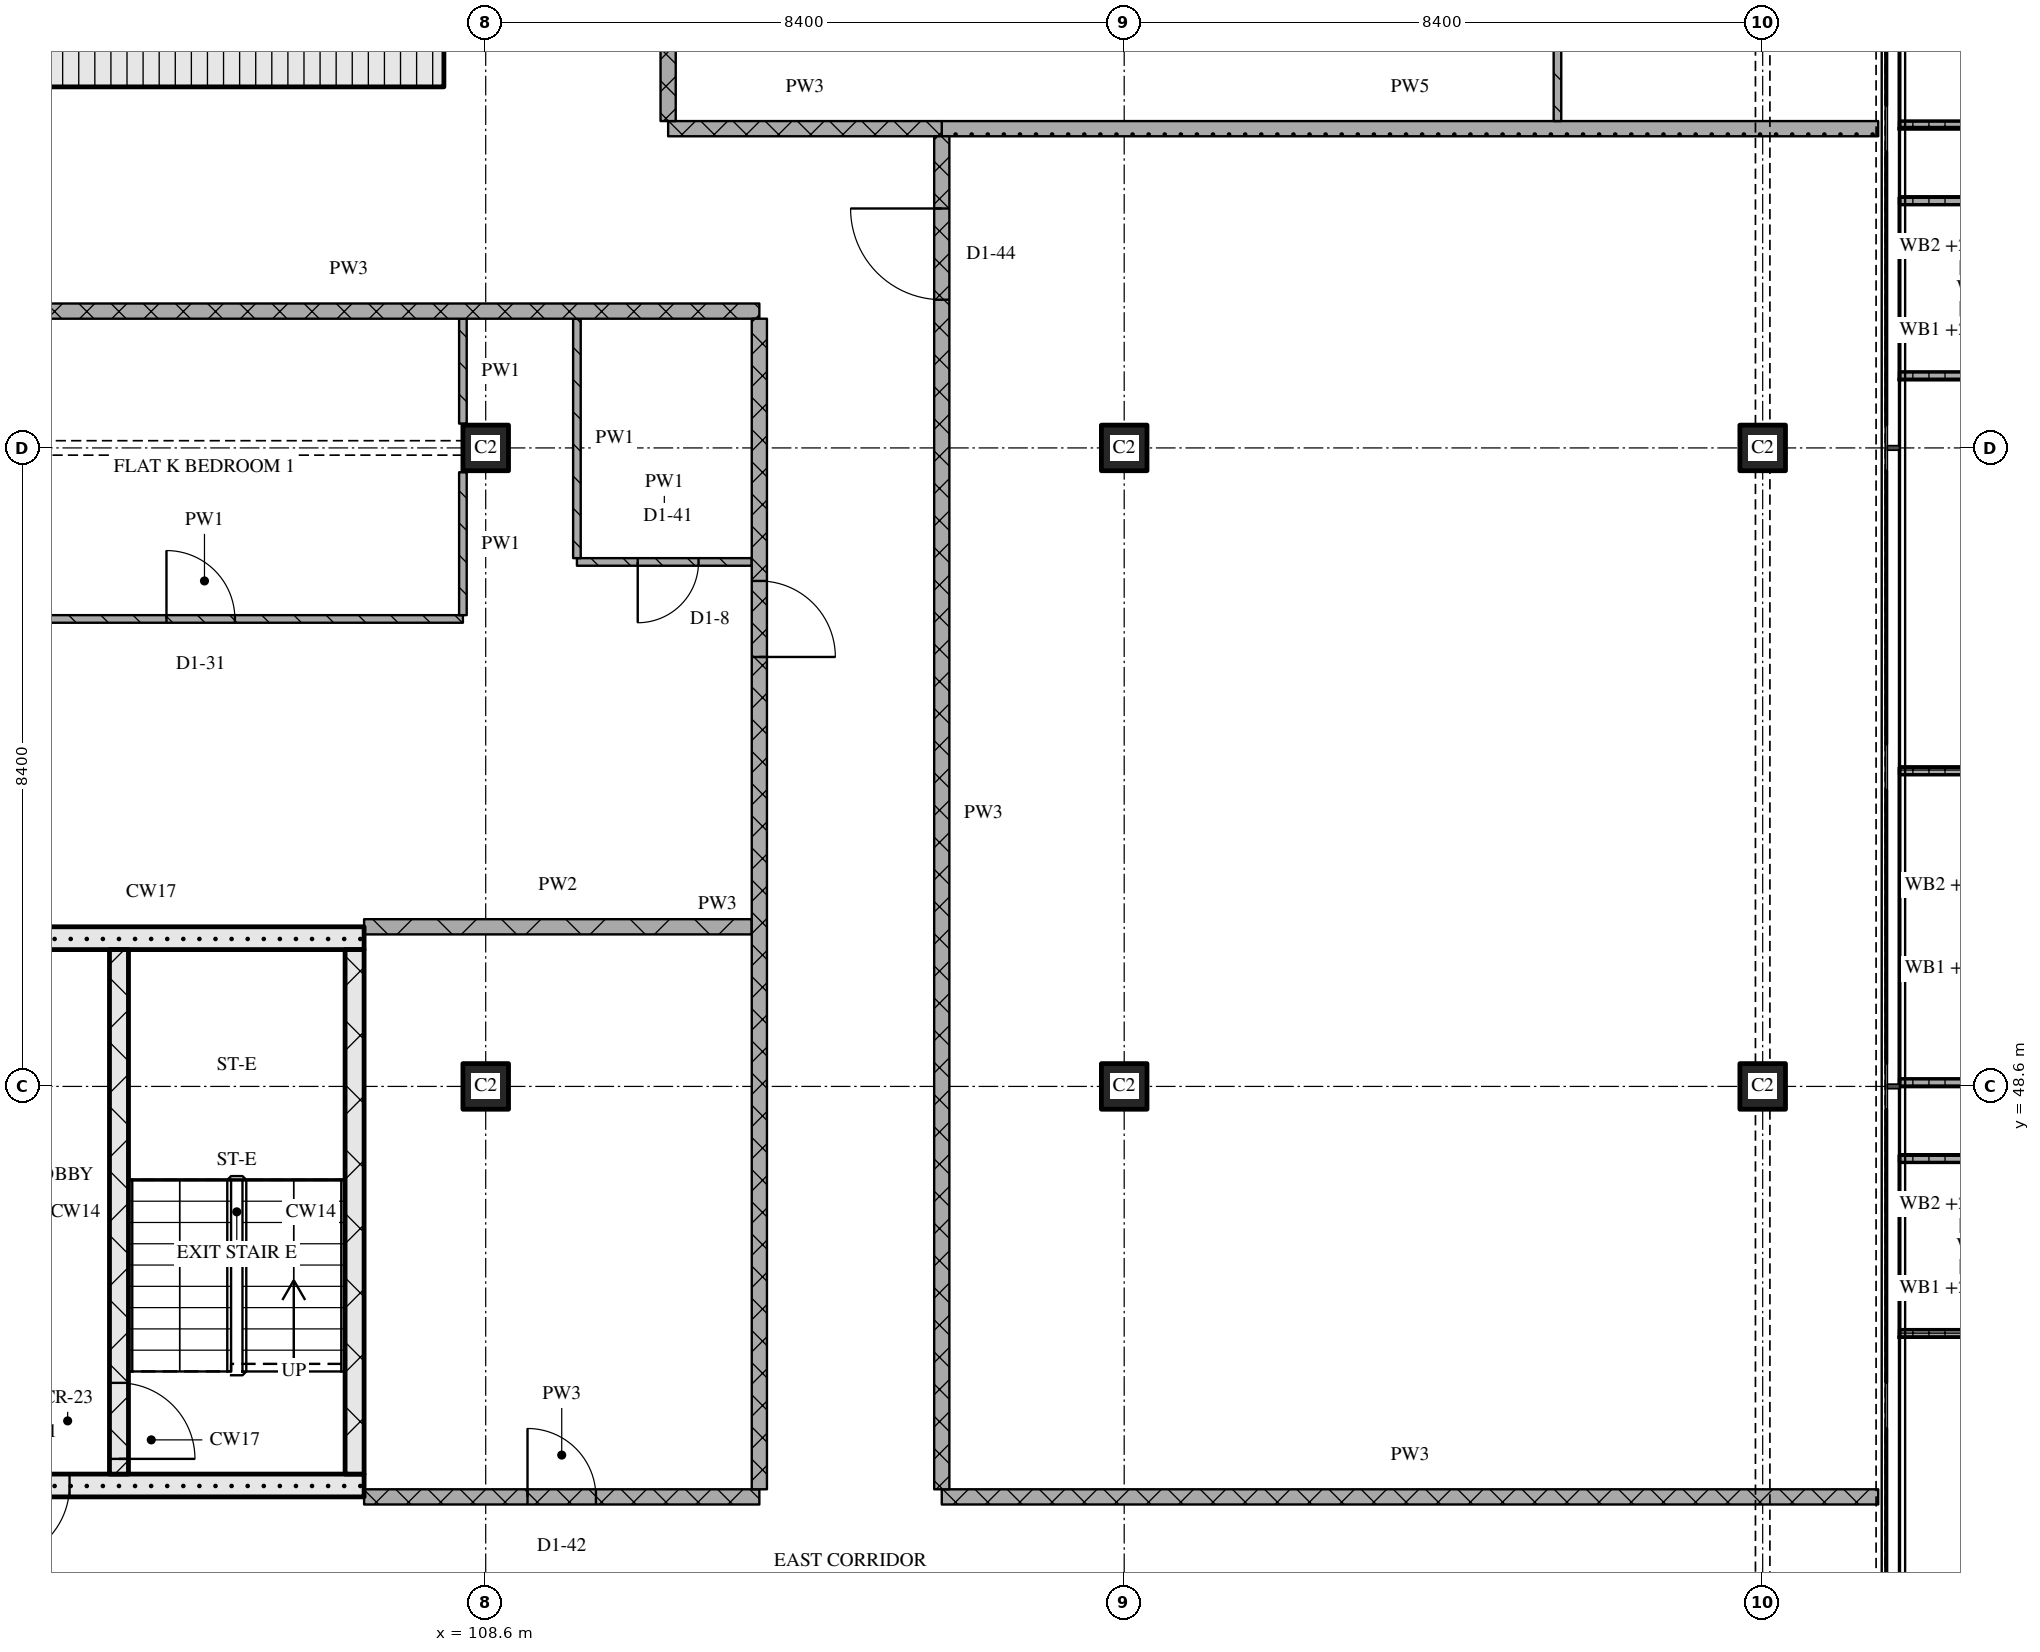
"""IFC4 building model, lengths in metres.
Left out: names, types, materials, properties, quantities, classifications, styles, units other than length and angle.
Written with IfcOpenShell. Run it as: python <this file> out.ifc"""

import sys

from ifc_helpers import new_model, si_unit, direction, frame, frame_2d, origin, origin_2d, place, context, subcontext, project, spatial, polyline, rectangle, outline, extrude, element, fill, save


model = new_model("IFC4")
c1 = context("Model", 3, precision=1e-05, world=origin(), true_north=direction((0.0, 1.0)))
c2 = subcontext(c1, "Body", "Model", "MODEL_VIEW")
j1 = project(units=[si_unit("LENGTHUNIT", "METRE"), si_unit("PLANEANGLEUNIT", "RADIAN")], contexts=[c1])
p1 = place(None, origin())
s1 = spatial("IfcSite", under=j1, at=p1, CompositionType="ELEMENT")
p2 = place(p1, origin())
s2 = spatial("IfcBuilding", under=s1, at=p2, CompositionType="ELEMENT")
p3 = place(p2, frame((0.0, 0.0, 209.1)))
s3 = spatial("IfcBuildingStorey", under=s2, at=p3, CompositionType="ELEMENT", Elevation=209.1)
for number, where, z_axis, x_axis in (
    (1, (108.6, 48.6, 0.0), (0.0, 0.0, 1.0), (1.0, 0.0, 0.0)),
    (2, (108.6, 57.0, 0.0), (0.0, 0.0, 1.0), (1.0, 0.0, 0.0)),
    (3, (117.0, 48.6, 0.0), (0.0, 0.0, 1.0), (1.0, 0.0, 0.0)),
    (4, (117.0, 57.0, 0.0), (0.0, 0.0, 1.0), (1.0, 0.0, 0.0)),
    (5, (125.4, 48.6, 0.0), (0.0, 0.0, 1.0), (1.0, 0.0, 0.0)),
    (6, (125.4, 57.0, 0.0), (0.0, 0.0, 1.0), (1.0, 0.0, 0.0)),
):
    element("IfcColumn", number, at=place(p3, frame(where, z_axis=z_axis, x_axis=x_axis)), inside=s3, PredefinedType="COLUMN", context=c2, shape_type="SweptSolid", body=[
        extrude(rectangle(XDim=0.6, YDim=0.6, at=origin_2d()), origin(), (0.0, 0.0, 1.0), 3.6),
    ])
p4 = place(p3, origin())
e7 = element("IfcWall", 7, at=p4, inside=s3, PredefinedType="SOLIDWALL", context=c2, shape_type="SweptSolid", body=[
    extrude(outline(polyline([(127.2, 45.3), (127.2, 45.4), (128.7, 45.4), (128.7, 47.6), (127.2, 47.6), (127.2, 47.7), (128.8, 47.7), (128.8, 45.3), (127.2, 45.3)])), origin(), (0.0, 0.0, 1.0), 1.0),
])
p5 = place(p3, origin())
e8 = element("IfcWall", 8, at=p5, inside=s3, PredefinedType="SOLIDWALL", context=c2, shape_type="SweptSolid", body=[
    extrude(outline(polyline([(127.2, 48.6), (127.2, 48.7), (128.833, 48.7), (128.833, 52.7), (127.2, 52.7), (127.2, 52.8), (128.933, 52.8), (128.933, 48.6), (127.2, 48.6)])), origin(), (0.0, 0.0, 1.0), 1.0),
])
p6 = place(p3, origin())
e9 = element("IfcWall", 9, at=p6, inside=s3, PredefinedType="SOLIDWALL", context=c2, shape_type="SweptSolid", body=[
    extrude(outline(polyline([(127.2, 57.9), (127.2, 58.0), (128.7, 58.0), (128.7, 60.2), (127.2, 60.2), (127.2, 60.3), (128.8, 60.3), (128.8, 57.9), (127.2, 57.9)])), origin(), (0.0, 0.0, 1.0), 1.0),
])
p7 = place(p3, origin())
e10 = element("IfcWall", 10, at=p7, inside=s3, PredefinedType="SOLIDWALL", context=c2, shape_type="SweptSolid", body=[
    extrude(outline(polyline([(127.2, 61.2), (127.2, 61.3), (128.833, 61.3), (128.833, 65.3), (127.2, 65.3), (127.2, 65.4), (128.933, 65.4), (128.933, 61.2), (127.2, 61.2)])), origin(), (0.0, 0.0, 1.0), 1.0),
])
p8 = place(p3, frame((67.15, 62.075, 0.0), z_axis=(0.0, 0.0, 1.0), x_axis=(1.0, 0.0, 0.0)))
e11 = element("IfcWall", 11, at=p8, inside=s3, PredefinedType="SOLIDWALL", context=c2, shape_type="SweptSolid", body=[
    extrude(rectangle(XDim=40.9, YDim=0.65, at=frame_2d((20.45, 0.0))), origin(), (0.0, 0.0, 1.0), 3.32),
])
p9 = place(p8, frame((20.8, 0.0, 0.0)))
e12 = element("IfcOpeningElement", 12, at=p9, cuts=e11, PredefinedType="OPENING", context=c2, shape_type="SweptSolid", body=[
    extrude(rectangle(XDim=1.8, YDim=2.1, at=frame_2d((0.9, 1.05))), frame((0.0, 0.335, 0.0), z_axis=(0.0, -1.0, 0.0), x_axis=(1.0, 0.0, 0.0)), (0.0, 0.0, 1.0), 0.67),
])
p10 = place(p3, frame((101.4, 43.35, 0.0), z_axis=(0.0, 0.0, 1.0), x_axis=(1.0, 0.0, 0.0)))
e13 = element("IfcWall", 13, at=p10, inside=s3, PredefinedType="SOLIDWALL", context=c2, shape_type="SweptSolid", body=[
    extrude(rectangle(XDim=5.6, YDim=0.3, at=frame_2d((2.8, 0.0))), origin(), (0.0, 0.0, 1.0), 3.32),
])
p11 = place(p10, frame((0.725, 0.0, 0.0)))
e14 = element("IfcOpeningElement", 14, at=p11, cuts=e13, PredefinedType="OPENING", context=c2, shape_type="SweptSolid", body=[
    extrude(rectangle(XDim=1.0, YDim=2.1, at=frame_2d((0.5, 1.05))), frame((0.0, 0.16, 0.0), z_axis=(0.0, -1.0, 0.0), x_axis=(1.0, 0.0, 0.0)), (0.0, 0.0, 1.0), 0.32),
])
p12 = place(p3, frame((103.775, 43.5, 0.0), z_axis=(0.0, 0.0, 1.0), x_axis=(0.0, 1.0, 0.0)))
e15 = element("IfcWall", 15, at=p12, inside=s3, PredefinedType="SOLIDWALL", context=c2, shape_type="SweptSolid", body=[
    extrude(rectangle(XDim=6.9, YDim=0.25, at=frame_2d((3.45, 0.0))), origin(), (0.0, 0.0, 1.0), 3.32),
])
p13 = place(p12, frame((0.2, 0.0, 0.0)))
e16 = element("IfcOpeningElement", 16, at=p13, cuts=e15, PredefinedType="OPENING", context=c2, shape_type="SweptSolid", body=[
    extrude(rectangle(XDim=1.0, YDim=2.1, at=frame_2d((0.5, 1.05))), frame((0.0, 0.135, 0.0), z_axis=(0.0, -1.0, 0.0), x_axis=(1.0, 0.0, 0.0)), (0.0, 0.0, 1.0), 0.27),
])
p14 = place(p3, frame((106.875, 43.5, 0.0), z_axis=(0.0, 0.0, 1.0), x_axis=(0.0, 1.0, 0.0)))
e17 = element("IfcWall", 17, at=p14, inside=s3, PredefinedType="SOLIDWALL", context=c2, shape_type="SweptSolid", body=[
    extrude(rectangle(XDim=6.9, YDim=0.25, at=frame_2d((3.45, 0.0))), origin(), (0.0, 0.0, 1.0), 3.32),
])
p15 = place(p3, frame((101.4, 50.55, 0.0), z_axis=(0.0, 0.0, 1.0), x_axis=(1.0, 0.0, 0.0)))
e18 = element("IfcWall", 18, at=p15, inside=s3, PredefinedType="SOLIDWALL", context=c2, shape_type="SweptSolid", body=[
    extrude(rectangle(XDim=5.6, YDim=0.3, at=frame_2d((2.8, 0.0))), origin(), (0.0, 0.0, 1.0), 3.32),
])
p16 = place(p3, frame((107.0, 43.2, 0.0), z_axis=(0.0, 0.0, 1.0), x_axis=(1.0, 0.0, 0.0)))
e19 = element("IfcWall", 19, at=p16, inside=s3, PredefinedType="PARTITIONING", context=c2, shape_type="SweptSolid", body=[
    extrude(rectangle(XDim=5.2, YDim=0.2, at=frame_2d((2.6, 0.0))), origin(), (0.0, 0.0, 1.0), 3.32),
])
p17 = place(p16, frame((2.15, 0.0, 0.0)))
e20 = element("IfcOpeningElement", 20, at=p17, cuts=e19, PredefinedType="OPENING", context=c2, shape_type="SweptSolid", body=[
    extrude(rectangle(XDim=0.9, YDim=2.1, at=frame_2d((0.45, 1.05))), frame((0.0, 0.11, 0.0), z_axis=(0.0, -1.0, 0.0), x_axis=(1.0, 0.0, 0.0)), (0.0, 0.0, 1.0), 0.22),
])
p18 = place(p3, frame((114.6, 43.2, 0.0), z_axis=(0.0, 0.0, 1.0), x_axis=(1.0, 0.0, 0.0)))
e21 = element("IfcWall", 21, at=p18, inside=s3, PredefinedType="PARTITIONING", context=c2, shape_type="SweptSolid", body=[
    extrude(rectangle(XDim=12.32, YDim=0.2, at=frame_2d((6.16, 0.0))), origin(), (0.0, 0.0, 1.0), 3.32),
])
p19 = place(p3, frame((107.0, 50.7, 0.0), z_axis=(0.0, 0.0, 1.0), x_axis=(1.0, 0.0, 0.0)))
e22 = element("IfcWall", 22, at=p19, inside=s3, PredefinedType="PARTITIONING", context=c2, shape_type="SweptSolid", body=[
    extrude(rectangle(XDim=5.1, YDim=0.2, at=frame_2d((2.55, 0.0))), origin(), (0.0, 0.0, 1.0), 3.32),
])
p20 = place(p3, frame((101.5, 54.75, 0.0), z_axis=(0.0, 0.0, 1.0), x_axis=(1.0, 0.0, 0.0)))
e23 = element("IfcWall", 23, at=p20, inside=s3, PredefinedType="PARTITIONING", context=c2, shape_type="SweptSolid", body=[
    extrude(rectangle(XDim=6.8, YDim=0.1, at=frame_2d((3.4, 0.0))), origin(), (0.0, 0.0, 1.0), 3.32),
])
p21 = place(p20, frame((2.9, 0.0, 0.0)))
e24 = element("IfcOpeningElement", 24, at=p21, cuts=e23, PredefinedType="OPENING", context=c2, shape_type="SweptSolid", body=[
    extrude(rectangle(XDim=0.9, YDim=2.1, at=frame_2d((0.45, 1.05))), frame((0.0, 0.06, 0.0), z_axis=(0.0, -1.0, 0.0), x_axis=(1.0, 0.0, 0.0)), (0.0, 0.0, 1.0), 0.12),
])
p22 = place(p3, frame((109.8, 55.5, 0.0), z_axis=(0.0, 0.0, 1.0), x_axis=(1.0, 0.0, 0.0)))
e25 = element("IfcWall", 25, at=p22, inside=s3, PredefinedType="PARTITIONING", context=c2, shape_type="SweptSolid", body=[
    extrude(rectangle(XDim=2.3, YDim=0.1, at=frame_2d((1.15, 0.0))), origin(), (0.0, 0.0, 1.0), 3.32),
])
p23 = place(p22, frame((0.8, 0.0, 0.0)))
e26 = element("IfcOpeningElement", 26, at=p23, cuts=e25, PredefinedType="OPENING", context=c2, shape_type="SweptSolid", body=[
    extrude(rectangle(XDim=0.8, YDim=2.1, at=frame_2d((0.4, 1.05))), frame((0.0, 0.06, 0.0), z_axis=(0.0, -1.0, 0.0), x_axis=(1.0, 0.0, 0.0)), (0.0, 0.0, 1.0), 0.12),
])
p24 = place(p3, frame((101.4, 58.8, 0.0), z_axis=(0.0, 0.0, 1.0), x_axis=(1.0, 0.0, 0.0)))
e27 = element("IfcWall", 27, at=p24, inside=s3, PredefinedType="PARTITIONING", context=c2, shape_type="SweptSolid", body=[
    extrude(rectangle(XDim=10.8, YDim=0.2, at=frame_2d((5.4, 0.0))), origin(), (0.0, 0.0, 1.0), 3.32),
])
p25 = place(p3, frame((111.0, 61.2, 0.0), z_axis=(0.0, 0.0, 1.0), x_axis=(1.0, 0.0, 0.0)))
e28 = element("IfcWall", 28, at=p25, inside=s3, PredefinedType="PARTITIONING", context=c2, shape_type="SweptSolid", body=[
    extrude(rectangle(XDim=3.6, YDim=0.2, at=frame_2d((1.8, 0.0))), origin(), (0.0, 0.0, 1.0), 3.32),
])
p26 = place(p3, frame((114.6, 61.2, 0.0), z_axis=(0.0, 0.0, 1.0), x_axis=(1.0, 0.0, 0.0)))
e29 = element("IfcWall", 29, at=p26, inside=s3, PredefinedType="PARTITIONING", context=c2, shape_type="SweptSolid", body=[
    extrude(rectangle(XDim=12.32, YDim=0.2, at=frame_2d((6.16, 0.0))), origin(), (0.0, 0.0, 1.0), 3.32),
])
p27 = place(p3, frame((108.3, 56.68, 0.0), z_axis=(0.0, 0.0, 1.0), x_axis=(0.0, -1.0, 0.0)))
e30 = element("IfcWall", 30, at=p27, inside=s3, PredefinedType="PARTITIONING", context=c2, shape_type="SweptSolid", body=[
    extrude(rectangle(XDim=1.88, YDim=0.1, at=frame_2d((0.94, 0.0))), origin(), (0.0, 0.0, 1.0), 3.32),
])
p28 = place(p3, frame((108.3, 58.7, 0.0), z_axis=(0.0, 0.0, 1.0), x_axis=(0.0, -1.0, 0.0)))
e31 = element("IfcWall", 31, at=p28, inside=s3, PredefinedType="PARTITIONING", context=c2, shape_type="SweptSolid", body=[
    extrude(rectangle(XDim=1.38, YDim=0.1, at=frame_2d((0.69, 0.0))), origin(), (0.0, 0.0, 1.0), 3.32),
])
p29 = place(p3, frame((109.8, 58.7, 0.0), z_axis=(0.0, 0.0, 1.0), x_axis=(0.0, -1.0, 0.0)))
e32 = element("IfcWall", 32, at=p29, inside=s3, PredefinedType="PARTITIONING", context=c2, shape_type="SweptSolid", body=[
    extrude(rectangle(XDim=3.15, YDim=0.1, at=frame_2d((1.575, 0.0))), origin(), (0.0, 0.0, 1.0), 3.32),
])
p30 = place(p3, frame((111.0, 75.32, 0.0), z_axis=(0.0, 0.0, 1.0), x_axis=(0.0, -1.0, 0.0)))
e33 = element("IfcWall", 33, at=p30, inside=s3, PredefinedType="PARTITIONING", context=c2, shape_type="SweptSolid", body=[
    extrude(rectangle(XDim=14.02, YDim=0.2, at=frame_2d((7.01, 0.0))), origin(), (0.0, 0.0, 1.0), 3.32),
])
p31 = place(p30, frame((4.77, 0.0, 0.0)))
e34 = element("IfcOpeningElement", 34, at=p31, cuts=e33, PredefinedType="OPENING", context=c2, shape_type="SweptSolid", body=[
    extrude(rectangle(XDim=1.0, YDim=2.1, at=frame_2d((0.5, 1.05))), frame((0.0, 0.11, 0.0), z_axis=(0.0, -1.0, 0.0), x_axis=(1.0, 0.0, 0.0)), (0.0, 0.0, 1.0), 0.22),
])
p32 = place(p3, frame((112.2, 43.3, 0.0), z_axis=(0.0, 0.0, 1.0), x_axis=(0.0, 1.0, 0.0)))
e35 = element("IfcWall", 35, at=p32, inside=s3, PredefinedType="PARTITIONING", context=c2, shape_type="SweptSolid", body=[
    extrude(rectangle(XDim=15.4, YDim=0.2, at=frame_2d((7.7, 0.0))), origin(), (0.0, 0.0, 1.0), 3.32),
])
p33 = place(p32, frame((10.95, 0.0, 0.0)))
e36 = element("IfcOpeningElement", 36, at=p33, cuts=e35, PredefinedType="OPENING", context=c2, shape_type="SweptSolid", body=[
    extrude(rectangle(XDim=1.0, YDim=2.1, at=frame_2d((0.5, 1.05))), frame((0.0, 0.11, 0.0), z_axis=(0.0, -1.0, 0.0), x_axis=(1.0, 0.0, 0.0)), (0.0, 0.0, 1.0), 0.22),
])
p34 = place(p3, frame((114.6, 61.1, 0.0), z_axis=(0.0, 0.0, 1.0), x_axis=(0.0, -1.0, 0.0)))
e37 = element("IfcWall", 37, at=p34, inside=s3, PredefinedType="PARTITIONING", context=c2, shape_type="SweptSolid", body=[
    extrude(rectangle(XDim=17.8, YDim=0.2, at=frame_2d((8.9, 0.0))), origin(), (0.0, 0.0, 1.0), 3.32),
])
p35 = place(p34, frame((0.95, 0.0, 0.0)))
e38 = element("IfcOpeningElement", 38, at=p35, cuts=e37, PredefinedType="OPENING", context=c2, shape_type="SweptSolid", body=[
    extrude(rectangle(XDim=1.2, YDim=2.1, at=frame_2d((0.6, 1.05))), frame((0.0, 0.11, 0.0), z_axis=(0.0, -1.0, 0.0), x_axis=(1.0, 0.0, 0.0)), (0.0, 0.0, 1.0), 0.22),
])
p36 = place(p3, frame((122.7, 69.55, 0.0), z_axis=(0.0, 0.0, 1.0), x_axis=(0.0, -1.0, 0.0)))
e39 = element("IfcWall", 39, at=p36, inside=s3, PredefinedType="PARTITIONING", context=c2, shape_type="SweptSolid", body=[
    extrude(rectangle(XDim=8.25, YDim=0.1, at=frame_2d((4.125, 0.0))), origin(), (0.0, 0.0, 1.0), 3.32),
])
p37 = place(p11, origin())
e40 = element("IfcDoor", 40, at=p37, inside=s3, OperationType="SINGLE_SWING_RIGHT", PredefinedType="DOOR", context=c2, shape_type="SweptSolid", body=[
    extrude(rectangle(XDim=1.0, YDim=2.1, at=frame_2d((0.5, 1.05))), frame((0.0, 0.025, 0.0), z_axis=(0.0, -1.0, 0.0), x_axis=(1.0, 0.0, 0.0)), (0.0, 0.0, 1.0), 0.05),
])
fill(e14, e40)
p38 = place(p13, origin())
e41 = element("IfcDoor", 41, at=p38, inside=s3, OperationType="SINGLE_SWING_RIGHT", PredefinedType="DOOR", context=c2, shape_type="SweptSolid", body=[
    extrude(rectangle(XDim=1.0, YDim=2.1, at=frame_2d((0.5, 1.05))), frame((0.0, 0.025, 0.0), z_axis=(0.0, -1.0, 0.0), x_axis=(1.0, 0.0, 0.0)), (0.0, 0.0, 1.0), 0.05),
])
fill(e16, e41)
p39 = place(p17, origin())
e42 = element("IfcDoor", 42, at=p39, inside=s3, OperationType="SINGLE_SWING_LEFT", PredefinedType="DOOR", context=c2, shape_type="SweptSolid", body=[
    extrude(rectangle(XDim=0.9, YDim=2.1, at=frame_2d((0.45, 1.05))), frame((0.0, 0.025, 0.0), z_axis=(0.0, -1.0, 0.0), x_axis=(1.0, 0.0, 0.0)), (0.0, 0.0, 1.0), 0.05),
])
fill(e20, e42)
p40 = place(p21, origin())
e43 = element("IfcDoor", 43, at=p40, inside=s3, OperationType="SINGLE_SWING_LEFT", PredefinedType="DOOR", context=c2, shape_type="SweptSolid", body=[
    extrude(rectangle(XDim=0.9, YDim=2.1, at=frame_2d((0.45, 1.05))), frame((0.0, 0.025, 0.0), z_axis=(0.0, -1.0, 0.0), x_axis=(1.0, 0.0, 0.0)), (0.0, 0.0, 1.0), 0.05),
])
fill(e24, e43)
p41 = place(p23, origin())
e44 = element("IfcDoor", 44, at=p41, inside=s3, OperationType="SINGLE_SWING_RIGHT", PredefinedType="DOOR", context=c2, shape_type="SweptSolid", body=[
    extrude(rectangle(XDim=0.8, YDim=2.1, at=frame_2d((0.4, 1.05))), frame((0.0, 0.025, 0.0), z_axis=(0.0, -1.0, 0.0), x_axis=(1.0, 0.0, 0.0)), (0.0, 0.0, 1.0), 0.05),
])
fill(e26, e44)
p42 = place(p33, origin())
e45 = element("IfcDoor", 45, at=p42, inside=s3, OperationType="SINGLE_SWING_RIGHT", PredefinedType="DOOR", context=c2, shape_type="SweptSolid", body=[
    extrude(rectangle(XDim=1.0, YDim=2.1, at=frame_2d((0.5, 1.05))), frame((0.0, 0.025, 0.0), z_axis=(0.0, -1.0, 0.0), x_axis=(1.0, 0.0, 0.0)), (0.0, 0.0, 1.0), 0.05),
])
fill(e36, e45)
p43 = place(p35, origin())
e46 = element("IfcDoor", 46, at=p43, inside=s3, OperationType="SINGLE_SWING_RIGHT", PredefinedType="DOOR", context=c2, shape_type="SweptSolid", body=[
    extrude(rectangle(XDim=1.2, YDim=2.1, at=frame_2d((0.6, 1.05))), frame((0.0, 0.025, 0.0), z_axis=(0.0, -1.0, 0.0), x_axis=(1.0, 0.0, 0.0)), (0.0, 0.0, 1.0), 0.05),
])
fill(e38, e46)
save(model, sys.argv[1])
